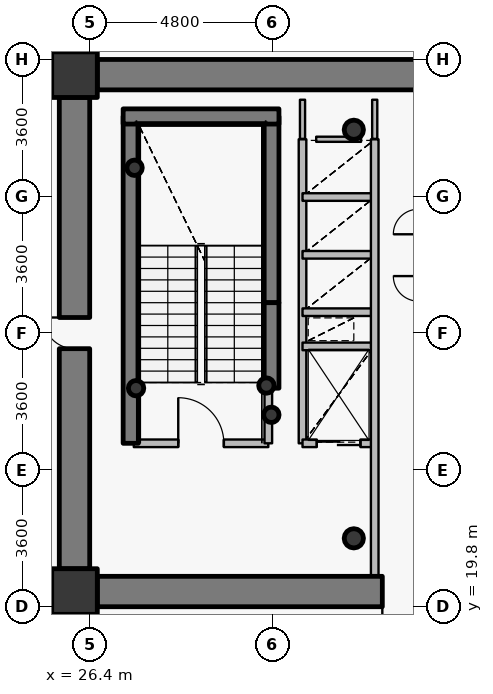
"""IFC4 building model, lengths in metres.
Left out: names, types, materials, properties, quantities, classifications, styles, units other than length and angle.
Written with IfcOpenShell. Run it as: python <this file> out.ifc"""

import sys

from ifc_helpers import new_model, si_unit, direction, frame, frame_2d, origin, origin_2d, place, context, subcontext, project, spatial, rectangle, hollow_circle, extrude, source, transform, mapped, element, fill, save


model = new_model("IFC4")
c1 = context("Model", 3, precision=1e-05, world=origin(), true_north=direction((0.0, 1.0)))
c2 = subcontext(c1, "Body", "Model", "MODEL_VIEW")
j1 = project(units=[si_unit("LENGTHUNIT", "METRE"), si_unit("PLANEANGLEUNIT", "RADIAN")], contexts=[c1])
p1 = place(None, origin())
s1 = spatial("IfcSite", under=j1, at=p1, CompositionType="ELEMENT")
p2 = place(p1, origin())
s2 = spatial("IfcBuilding", under=s1, at=p2, CompositionType="ELEMENT")
p3 = place(p2, frame((0.0, 0.0, 108.45)))
s3 = spatial("IfcBuildingStorey", under=s2, at=p3, CompositionType="ELEMENT", Elevation=108.45)
for number, where, z_axis, x_axis in (
    (1, (26.0, 20.2, 0.0), (0.0, 0.0, 1.0), (1.0, 0.0, 0.0)),
    (2, (26.0, 33.8, 0.0), (0.0, 0.0, 1.0), (1.0, 0.0, 0.0)),
):
    element("IfcColumn", number, at=place(p3, frame(where, z_axis=z_axis, x_axis=x_axis)), inside=s3, PredefinedType="COLUMN", context=c2, shape_type="SweptSolid", body=[
        extrude(rectangle(XDim=1.2, YDim=1.2, at=origin_2d()), origin(), (0.0, 0.0, 1.0), 3.75),
    ])
for number, where, z_axis, x_axis in (
    (3, (33.35, 21.6, 0.0), (0.0, 0.0, 1.0), (1.0, 0.0, 0.0)),
    (4, (33.35, 32.35, 0.0), (0.0, 0.0, 1.0), (1.0, 0.0, 0.0)),
):
    element("IfcColumn", number, at=place(p3, frame(where, z_axis=z_axis, x_axis=x_axis)), inside=s3, PredefinedType="COLUMN", context=c2, shape_type="SweptSolid", body=[
        extrude(hollow_circle(Radius=0.254, WallThickness=0.02, at=origin_2d()), origin(), (0.0, 0.0, 1.0), 3.75),
    ])
p4 = place(p3, frame((27.48, 24.1, 0.0), z_axis=(0.0, 0.0, 1.0), x_axis=(0.0, 1.0, 0.0)))
e5 = element("IfcWall", 5, at=p4, inside=s3, PredefinedType="SHEAR", context=c2, shape_type="SweptSolid", body=[
    extrude(rectangle(XDim=8.6, YDim=0.4, at=frame_2d((4.3, 0.0))), origin(), (0.0, 0.0, 1.0), 3.75),
])
p5 = place(p3, frame((31.18, 27.8, 0.0), z_axis=(0.0, 0.0, 1.0), x_axis=(0.0, 1.0, 0.0)))
e6 = element("IfcWall", 6, at=p5, inside=s3, PredefinedType="SHEAR", context=c2, shape_type="SweptSolid", body=[
    extrude(rectangle(XDim=4.9, YDim=0.4, at=frame_2d((2.45, 0.0))), origin(), (0.0, 0.0, 1.0), 3.75),
])
p6 = place(p3, frame((27.28, 32.7, 0.0), z_axis=(0.0, 0.0, 1.0), x_axis=(1.0, 0.0, 0.0)))
e7 = element("IfcWall", 7, at=p6, inside=s3, PredefinedType="SHEAR", context=c2, shape_type="SweptSolid", body=[
    extrude(rectangle(XDim=4.1, YDim=0.4, at=frame_2d((2.05, 0.0))), origin(), (0.0, 0.0, 1.0), 3.75),
])
for number, where, z_axis, x_axis in (
    (8, (27.58, 31.35, 0.0), (0.0, 0.0, 1.0), (1.0, 0.0, 0.0)),
    (9, (31.05, 25.62, 0.0), (0.0, 0.0, 1.0), (1.0, 0.0, 0.0)),
    (10, (31.18, 24.85, 0.0), (0.0, 0.0, 1.0), (1.0, 0.0, 0.0)),
    (11, (27.62, 25.55, 0.0), (0.0, 0.0, 1.0), (1.0, 0.0, 0.0)),
):
    element("IfcColumn", number, at=place(p3, frame(where, z_axis=z_axis, x_axis=x_axis)), inside=s3, PredefinedType="COLUMN", context=c2, shape_type="SweptSolid", body=[
        extrude(hollow_circle(Radius=0.203, WallThickness=0.016, at=origin_2d()), origin(), (0.0, 0.0, 1.0), 3.75),
    ])
p7 = place(p3, frame((26.6, 33.8, 0.0), z_axis=(0.0, 0.0, 1.0), x_axis=(1.0, 0.0, 0.0)))
e12 = element("IfcWall", 12, at=p7, inside=s3, PredefinedType="SHEAR", context=c2, shape_type="SweptSolid", body=[
    extrude(rectangle(XDim=18.8, YDim=0.8, at=frame_2d((9.4, 0.0))), origin(), (0.0, 0.0, 1.0), 2.95),
])
p8 = place(p3, frame((45.4, 20.2, 0.0), z_axis=(0.0, 0.0, 1.0), x_axis=(-1.0, 0.0, 0.0)))
e13 = element("IfcWall", 13, at=p8, inside=s3, PredefinedType="SHEAR", context=c2, shape_type="SweptSolid", body=[
    extrude(rectangle(XDim=18.8, YDim=0.8, at=frame_2d((9.4, 0.0))), origin(), (0.0, 0.0, 1.0), 2.95),
])
p9 = place(p8, frame((10.15, 0.0, 0.0)))
e14 = element("IfcOpeningElement", 14, at=p9, cuts=e13, PredefinedType="OPENING", context=c2, shape_type="SweptSolid", body=[
    extrude(rectangle(XDim=1.15, YDim=2.15, at=origin_2d()), frame((0.575, 0.41, 1.075), z_axis=(0.0, -1.0, 0.0), x_axis=(1.0, 0.0, 0.0)), (0.0, 0.0, 1.0), 0.82),
])
p10 = place(p3, frame((26.0, 20.8, 0.0), z_axis=(0.0, 0.0, 1.0), x_axis=(0.0, 1.0, 0.0)))
e15 = element("IfcWall", 15, at=p10, inside=s3, PredefinedType="SHEAR", context=c2, shape_type="SweptSolid", body=[
    extrude(rectangle(XDim=12.4, YDim=0.8, at=frame_2d((6.2, 0.0))), origin(), (0.0, 0.0, 1.0), 2.95),
])
p11 = place(p10, frame((5.79, 0.0, 0.0)))
e16 = element("IfcOpeningElement", 16, at=p11, cuts=e15, PredefinedType="OPENING", context=c2, shape_type="SweptSolid", body=[
    extrude(rectangle(XDim=0.82, YDim=2.1, at=origin_2d()), frame((0.41, 0.41, 1.05), z_axis=(0.0, -1.0, 0.0), x_axis=(1.0, 0.0, 0.0)), (0.0, 0.0, 1.0), 0.82),
])
p12 = place(p3, frame((31.18, 25.55, 0.0), z_axis=(0.0, 0.0, 1.0), x_axis=(0.0, 1.0, 0.0)))
e17 = element("IfcWall", 17, at=p12, inside=s3, PredefinedType="SHEAR", context=c2, shape_type="SweptSolid", body=[
    extrude(rectangle(XDim=2.25, YDim=0.4, at=frame_2d((1.125, 0.0))), origin(), (0.0, 0.0, 1.0), 3.1),
])
p13 = place(p3, frame((27.56, 24.1, 0.0), z_axis=(0.0, 0.0, 1.0), x_axis=(1.0, 0.0, 0.0)))
e18 = element("IfcWall", 18, at=p13, inside=s3, PredefinedType="PARTITIONING", context=c2, shape_type="SweptSolid", body=[
    extrude(rectangle(XDim=3.54, YDim=0.2, at=frame_2d((1.77, 0.0))), origin(), (0.0, 0.0, 1.0), 3.5),
])
p14 = place(p13, frame((1.17, 0.0, 0.0)))
e19 = element("IfcOpeningElement", 19, at=p14, cuts=e18, PredefinedType="OPENING", context=c2, shape_type="SweptSolid", body=[
    extrude(rectangle(XDim=1.2, YDim=2.15, at=origin_2d()), frame((0.6, 0.11, 1.075), z_axis=(0.0, -1.0, 0.0), x_axis=(1.0, 0.0, 0.0)), (0.0, 0.0, 1.0), 0.22),
])
p15 = place(p3, frame((31.1, 24.1, 0.0), z_axis=(0.0, 0.0, 1.0), x_axis=(0.0, 1.0, 0.0)))
e20 = element("IfcWall", 20, at=p15, inside=s3, PredefinedType="PARTITIONING", context=c2, shape_type="SweptSolid", body=[
    extrude(rectangle(XDim=1.44, YDim=0.2, at=frame_2d((0.72, 0.0))), origin(), (0.0, 0.0, 1.0), 3.5),
])
p16 = place(p3, frame((32.0, 24.1, 0.0), z_axis=(0.0, 0.0, 1.0), x_axis=(0.0, 1.0, 0.0)))
e21 = element("IfcWall", 21, at=p16, inside=s3, PredefinedType="PARTITIONING", context=c2, shape_type="SweptSolid", body=[
    extrude(rectangle(XDim=8.0, YDim=0.2, at=frame_2d((4.0, 0.0))), origin(), (0.0, 0.0, 1.0), 3.5),
])
p17 = place(p3, frame((32.0, 24.1, 0.0), z_axis=(0.0, 0.0, 1.0), x_axis=(1.0, 0.0, 0.0)))
e22 = element("IfcWall", 22, at=p17, inside=s3, PredefinedType="PARTITIONING", context=c2, shape_type="SweptSolid", body=[
    extrude(rectangle(XDim=1.9, YDim=0.2, at=frame_2d((0.95, 0.0))), origin(), (0.0, 0.0, 1.0), 3.085),
])
p18 = place(p17, frame((0.375, 0.0, 0.0)))
e23 = element("IfcOpeningElement", 23, at=p18, cuts=e22, PredefinedType="OPENING", context=c2, shape_type="SweptSolid", body=[
    extrude(rectangle(XDim=1.15, YDim=2.15, at=origin_2d()), frame((0.575, 0.11, 1.075), z_axis=(0.0, -1.0, 0.0), x_axis=(1.0, 0.0, 0.0)), (0.0, 0.0, 1.0), 0.22),
])
for number, where, z_axis, x_axis in (
    (24, (32.0, 26.65, 0.0), (0.0, 0.0, 1.0), (1.0, 0.0, 0.0)),
    (25, (32.0, 27.55, 0.0), (0.0, 0.0, 1.0), (1.0, 0.0, 0.0)),
    (26, (32.0, 29.06, 0.0), (0.0, 0.0, 1.0), (1.0, 0.0, 0.0)),
    (27, (32.0, 30.58, 0.0), (0.0, 0.0, 1.0), (1.0, 0.0, 0.0)),
):
    element("IfcWall", number, at=place(p3, frame(where, z_axis=z_axis, x_axis=x_axis)), inside=s3, PredefinedType="PARTITIONING", context=c2, shape_type="SweptSolid", body=[
        extrude(rectangle(XDim=1.9, YDim=0.2, at=frame_2d((0.95, 0.0))), origin(), (0.0, 0.0, 1.0), 3.085),
    ])
p19 = place(p3, frame((33.9, 20.6, 0.0), z_axis=(0.0, 0.0, 1.0), x_axis=(0.0, 1.0, 0.0)))
e28 = element("IfcWall", 28, at=p19, inside=s3, PredefinedType="PARTITIONING", context=c2, shape_type="SweptSolid", body=[
    extrude(rectangle(XDim=11.5, YDim=0.2, at=frame_2d((5.75, 0.0))), origin(), (0.0, 0.0, 1.0), 3.085),
])
p20 = place(p3, frame((32.36, 32.1, 0.0), z_axis=(0.0, 0.0, 1.0), x_axis=(1.0, 0.0, 0.0)))
e29 = element("IfcWall", 29, at=p20, inside=s3, PredefinedType="PARTITIONING", context=c2, shape_type="SweptSolid", body=[
    extrude(rectangle(XDim=1.18, YDim=0.135, at=frame_2d((0.59, 0.0))), origin(), (0.0, 0.0, 1.0), 3.085),
])
p21 = place(p3, frame((32.0, 33.14, 0.0), z_axis=(0.0, 0.0, 1.0), x_axis=(0.0, -1.0, 0.0)))
e30 = element("IfcWall", 30, at=p21, inside=s3, PredefinedType="PARTITIONING", context=c2, shape_type="SweptSolid", body=[
    extrude(rectangle(XDim=1.03, YDim=0.135, at=frame_2d((0.515, 0.0))), origin(), (0.0, 0.0, 1.0), 3.035),
])
p22 = place(p3, frame((33.9, 32.11, 0.0), z_axis=(0.0, 0.0, 1.0), x_axis=(0.0, 1.0, 0.0)))
e31 = element("IfcWall", 31, at=p22, inside=s3, PredefinedType="PARTITIONING", context=c2, shape_type="SweptSolid", body=[
    extrude(rectangle(XDim=1.03, YDim=0.135, at=frame_2d((0.515, 0.0))), origin(), (0.0, 0.0, 1.0), 3.085),
])
p23 = place(p3, frame((26.59, 34.2, 0.0), z_axis=(0.0, 0.0, 1.0), x_axis=(-1.0, 0.0, 0.0)))
e32 = element("IfcWall", 32, at=p23, inside=s3, PredefinedType="PARTITIONING", context=c2, shape_type="SweptSolid", body=[
    extrude(rectangle(XDim=0.99, YDim=0.135, at=frame_2d((0.495, 0.0))), origin(), (0.0, 0.0, 1.0), 2.935),
])
p24 = place(p3, frame((25.6, 33.893, 0.0), z_axis=(0.0, 0.0, 1.0), x_axis=(0.0, -1.0, 0.0)))
e33 = element("IfcWall", 33, at=p24, inside=s3, PredefinedType="PARTITIONING", context=c2, shape_type="SweptSolid", body=[
    extrude(rectangle(XDim=0.683, YDim=0.135, at=frame_2d((0.341, 0.0))), origin(), (0.0, 0.0, 1.0), 3.5),
])
p25 = place(p3, frame((25.6, 20.79, 0.0), z_axis=(0.0, 0.0, 1.0), x_axis=(0.0, -1.0, 0.0)))
e34 = element("IfcWall", 34, at=p25, inside=s3, PredefinedType="PARTITIONING", context=c2, shape_type="SweptSolid", body=[
    extrude(rectangle(XDim=0.99, YDim=0.135, at=frame_2d((0.495, 0.0))), origin(), (0.0, 0.0, 1.0), 3.5),
])
p26 = place(p3, frame((25.907, 19.8, 0.0), z_axis=(0.0, 0.0, 1.0), x_axis=(1.0, 0.0, 0.0)))
e35 = element("IfcWall", 35, at=p26, inside=s3, PredefinedType="PARTITIONING", context=c2, shape_type="SweptSolid", body=[
    extrude(rectangle(XDim=0.683, YDim=0.135, at=frame_2d((0.341, 0.0))), origin(), (0.0, 0.0, 1.0), 2.935),
])
m1 = source(origin(), c2, "Body", "SweptSolid", [
    extrude(rectangle(XDim=0.82, YDim=2.1, at=origin_2d()), frame((0.41, 0.025, 1.05), z_axis=(0.0, -1.0, 0.0), x_axis=(1.0, 0.0, 0.0)), (0.0, 0.0, 1.0), 0.05),
])
p27 = place(p11, origin())
e36 = element("IfcDoor", 36, at=p27, inside=s3, OperationType="SINGLE_SWING_RIGHT", PredefinedType="DOOR", context=c2, shape_type="MappedRepresentation", body=[
    mapped(m1, transform((0.0, 0.0, 0.0), x_axis=(1.0, 0.0, 0.0), y_axis=(0.0, 1.0, 0.0), z_axis=(0.0, 0.0, 1.0), scale=1.0)),
])
fill(e16, e36)
m2 = source(origin(), c2, "Body", "SweptSolid", [
    extrude(rectangle(XDim=1.15, YDim=2.15, at=origin_2d()), frame((0.575, 0.025, 1.075), z_axis=(0.0, -1.0, 0.0), x_axis=(1.0, 0.0, 0.0)), (0.0, 0.0, 1.0), 0.05),
])
p28 = place(p9, origin())
e37 = element("IfcDoor", 37, at=p28, inside=s3, OperationType="SINGLE_SWING_RIGHT", PredefinedType="DOOR", context=c2, shape_type="MappedRepresentation", body=[
    mapped(m2, transform((0.0, 0.0, 0.0), x_axis=(1.0, 0.0, 0.0), y_axis=(0.0, 1.0, 0.0), z_axis=(0.0, 0.0, 1.0), scale=1.0)),
])
fill(e14, e37)
m3 = source(origin(), c2, "Body", "SweptSolid", [
    extrude(rectangle(XDim=1.2, YDim=2.15, at=origin_2d()), frame((0.6, 0.025, 1.075), z_axis=(0.0, -1.0, 0.0), x_axis=(1.0, 0.0, 0.0)), (0.0, 0.0, 1.0), 0.05),
])
p29 = place(p14, origin())
e38 = element("IfcDoor", 38, at=p29, inside=s3, OperationType="SINGLE_SWING_LEFT", PredefinedType="DOOR", context=c2, shape_type="MappedRepresentation", body=[
    mapped(m3, transform((0.0, 0.0, 0.0), x_axis=(1.0, 0.0, 0.0), y_axis=(0.0, 1.0, 0.0), z_axis=(0.0, 0.0, 1.0), scale=1.0)),
])
fill(e19, e38)
m4 = source(origin(), c2, "Body", "SweptSolid", [
    extrude(rectangle(XDim=1.15, YDim=2.15, at=origin_2d()), frame((0.575, 0.025, 1.075), z_axis=(0.0, -1.0, 0.0), x_axis=(1.0, 0.0, 0.0)), (0.0, 0.0, 1.0), 0.05),
])
p30 = place(p18, origin())
e39 = element("IfcDoor", 39, at=p30, inside=s3, OperationType="DOUBLE_DOOR_SLIDING", PredefinedType="USERDEFINED", context=c2, shape_type="MappedRepresentation", body=[
    mapped(m4, transform((0.0, 0.0, 0.0), x_axis=(1.0, 0.0, 0.0), y_axis=(0.0, 1.0, 0.0), z_axis=(0.0, 0.0, 1.0), scale=1.0)),
])
fill(e23, e39)
save(model, sys.argv[1])
